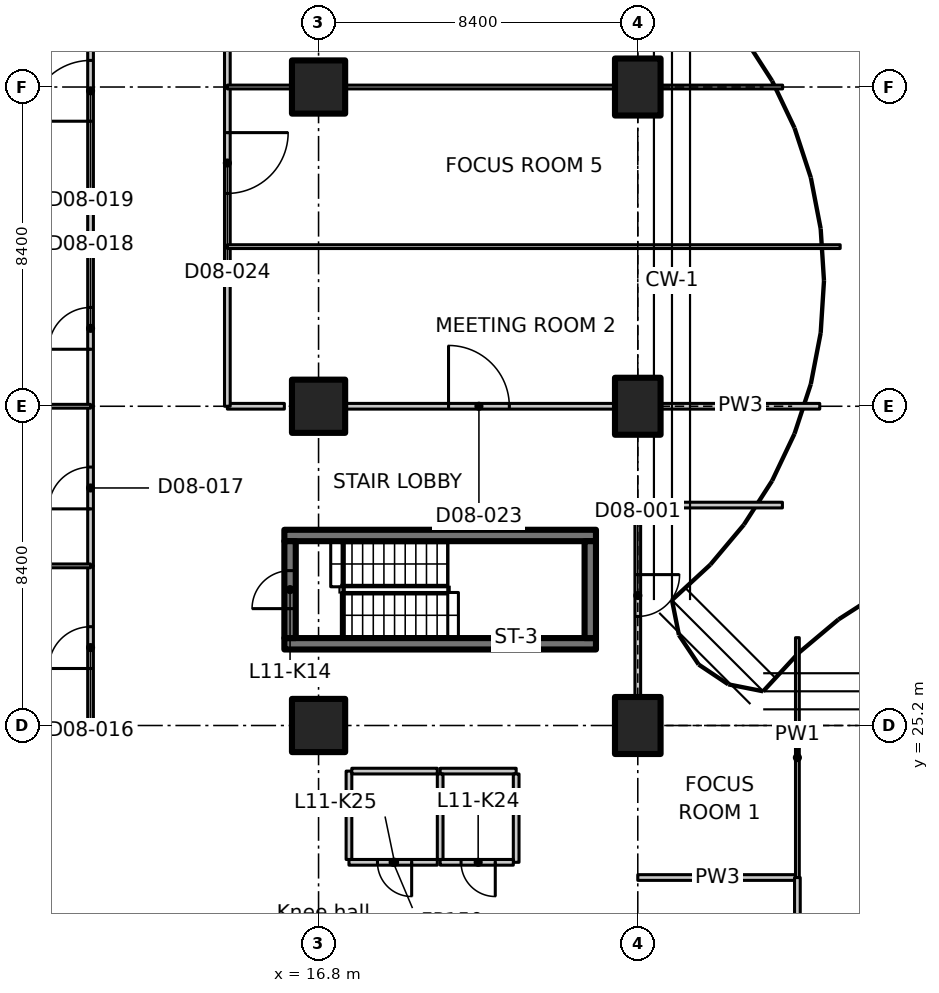
"""IFC4 building model, lengths in metres.
Left out: names, types, materials, properties, quantities, classifications, styles, units other than length and angle.
Written with IfcOpenShell. Run it as: python <this file> out.ifc"""

import sys

from ifc_helpers import new_model, si_unit, direction, frame, frame_2d, origin, origin_2d, place, context, subcontext, project, spatial, polyline, rectangle, outline, extrude, element, fill, save


model = new_model("IFC4")
c1 = context("Model", 3, precision=1e-05, world=origin(), true_north=direction((0.0, 1.0)))
c2 = subcontext(c1, "Body", "Model", "MODEL_VIEW")
j1 = project(units=[si_unit("LENGTHUNIT", "METRE"), si_unit("PLANEANGLEUNIT", "RADIAN")], contexts=[c1])
p1 = place(None, origin())
s1 = spatial("IfcSite", under=j1, at=p1, CompositionType="ELEMENT")
p2 = place(p1, origin())
s2 = spatial("IfcBuilding", under=s1, at=p2, CompositionType="ELEMENT")
p3 = place(p2, frame((0.0, 0.0, 54.5)))
s3 = spatial("IfcBuildingStorey", under=s2, at=p3, CompositionType="ELEMENT", Elevation=54.5)
for number, where, z_axis, x_axis in (
    (1, (16.8, 25.2, 0.0), (0.0, 0.0, 1.0), (1.0, 0.0, 0.0)),
    (2, (16.8, 33.6, 0.0), (0.0, 0.0, 1.0), (1.0, 0.0, 0.0)),
    (3, (16.8, 42.0, 0.0), (0.0, 0.0, 1.0), (1.0, 0.0, 0.0)),
):
    element("IfcColumn", number, at=place(p3, frame(where, z_axis=z_axis, x_axis=x_axis)), inside=s3, PredefinedType="COLUMN", context=c2, shape_type="SweptSolid", body=[
        extrude(rectangle(XDim=1.4, YDim=1.4, at=origin_2d()), origin(), (0.0, 0.0, 1.0), 3.35),
    ])
for number, where, z_axis, x_axis in (
    (4, (25.2, 25.2, 0.0), (0.0, 0.0, 1.0), (1.0, 0.0, 0.0)),
    (5, (25.2, 33.6, 0.0), (0.0, 0.0, 1.0), (1.0, 0.0, 0.0)),
    (6, (25.2, 42.0, 0.0), (0.0, 0.0, 1.0), (1.0, 0.0, 0.0)),
):
    element("IfcColumn", number, at=place(p3, frame(where, z_axis=z_axis, x_axis=x_axis)), inside=s3, PredefinedType="COLUMN", context=c2, shape_type="SweptSolid", body=[
        extrude(rectangle(XDim=1.2, YDim=1.5, at=origin_2d()), origin(), (0.0, 0.0, 1.0), 3.35),
    ])
for number, where, z_axis, x_axis in (
    (7, (15.9, 27.35, 0.0), (0.0, 0.0, 1.0), (1.0, 0.0, 0.0)),
    (8, (15.9, 30.2, 0.0), (0.0, 0.0, 1.0), (1.0, 0.0, 0.0)),
):
    element("IfcWall", number, at=place(p3, frame(where, z_axis=z_axis, x_axis=x_axis)), inside=s3, PredefinedType="SHEAR", context=c2, shape_type="SweptSolid", body=[
        extrude(rectangle(XDim=8.2, YDim=0.3, at=frame_2d((4.1, 0.0))), origin(), (0.0, 0.0, 1.0), 3.35),
    ])
p4 = place(p3, frame((16.05, 27.5, 0.0), z_axis=(0.0, 0.0, 1.0), x_axis=(0.0, 1.0, 0.0)))
e9 = element("IfcWall", 9, at=p4, inside=s3, PredefinedType="SHEAR", context=c2, shape_type="SweptSolid", body=[
    extrude(rectangle(XDim=2.55, YDim=0.3, at=frame_2d((1.275, 0.0))), origin(), (0.0, 0.0, 1.0), 3.35),
])
p5 = place(p4, frame((0.775, 0.0, 0.0)))
e10 = element("IfcOpeningElement", 10, at=p5, cuts=e9, PredefinedType="OPENING", context=c2, shape_type="SweptSolid", body=[
    extrude(rectangle(XDim=1.0, YDim=2.1, at=frame_2d((0.5, 1.05))), frame((0.0, 0.16, 0.0), z_axis=(0.0, -1.0, 0.0), x_axis=(1.0, 0.0, 0.0)), (0.0, 0.0, 1.0), 0.32),
])
p6 = place(p3, frame((23.95, 27.5, 0.0), z_axis=(0.0, 0.0, 1.0), x_axis=(0.0, 1.0, 0.0)))
e11 = element("IfcWall", 11, at=p6, inside=s3, PredefinedType="SHEAR", context=c2, shape_type="SweptSolid", body=[
    extrude(rectangle(XDim=2.55, YDim=0.3, at=frame_2d((1.275, 0.0))), origin(), (0.0, 0.0, 1.0), 3.35),
])
p7 = place(p3, frame((20.0, 24.0, 0.0), z_axis=(0.0, 0.0, 1.0), x_axis=(1.0, 0.0, 0.0)))
e12 = element("IfcWall", 12, at=p7, inside=s3, PredefinedType="PARTITIONING", context=c2, shape_type="SweptSolid", body=[
    extrude(rectangle(XDim=2.0, YDim=0.15, at=frame_2d((1.0, 0.0))), origin(), (0.0, 0.0, 1.0), 3.35),
])
p8 = place(p3, frame((22.0, 23.925, 0.0), z_axis=(0.0, 0.0, 1.0), x_axis=(0.0, -1.0, 0.0)))
e13 = element("IfcWall", 13, at=p8, inside=s3, PredefinedType="PARTITIONING", context=c2, shape_type="SweptSolid", body=[
    extrude(rectangle(XDim=2.325, YDim=0.15, at=frame_2d((1.163, 0.0))), origin(), (0.0, 0.0, 1.0), 3.35),
])
p9 = place(p3, frame((21.925, 21.6, 0.0), z_axis=(0.0, 0.0, 1.0), x_axis=(-1.0, 0.0, 0.0)))
e14 = element("IfcWall", 14, at=p9, inside=s3, PredefinedType="PARTITIONING", context=c2, shape_type="SweptSolid", body=[
    extrude(rectangle(XDim=1.925, YDim=0.15, at=frame_2d((0.962, 0.0))), origin(), (0.0, 0.0, 1.0), 3.35),
])
p10 = place(p9, frame((0.475, 0.0, 0.0)))
e15 = element("IfcOpeningElement", 15, at=p10, cuts=e14, PredefinedType="OPENING", context=c2, shape_type="SweptSolid", body=[
    extrude(rectangle(XDim=0.9, YDim=2.1, at=frame_2d((0.45, 1.05))), frame((0.0, 0.085, 0.0), z_axis=(0.0, -1.0, 0.0), x_axis=(1.0, 0.0, 0.0)), (0.0, 0.0, 1.0), 0.17),
])
p11 = place(p3, frame((20.0, 21.675, 0.0), z_axis=(0.0, 0.0, 1.0), x_axis=(0.0, 1.0, 0.0)))
e16 = element("IfcWall", 16, at=p11, inside=s3, PredefinedType="PARTITIONING", context=c2, shape_type="SweptSolid", body=[
    extrude(rectangle(XDim=2.25, YDim=0.15, at=frame_2d((1.125, 0.0))), origin(), (0.0, 0.0, 1.0), 3.35),
])
p12 = place(p3, frame((19.925, 21.6, 0.0), z_axis=(0.0, 0.0, 1.0), x_axis=(-1.0, 0.0, 0.0)))
e17 = element("IfcWall", 17, at=p12, inside=s3, PredefinedType="PARTITIONING", context=c2, shape_type="SweptSolid", body=[
    extrude(rectangle(XDim=2.325, YDim=0.15, at=frame_2d((1.163, 0.0))), origin(), (0.0, 0.0, 1.0), 3.35),
])
p13 = place(p12, frame((0.675, 0.0, 0.0)))
e18 = element("IfcOpeningElement", 18, at=p13, cuts=e17, PredefinedType="OPENING", context=c2, shape_type="SweptSolid", body=[
    extrude(rectangle(XDim=0.9, YDim=2.1, at=frame_2d((0.45, 1.05))), frame((0.0, 0.085, 0.0), z_axis=(0.0, -1.0, 0.0), x_axis=(1.0, 0.0, 0.0)), (0.0, 0.0, 1.0), 0.17),
])
p14 = place(p3, frame((17.6, 21.675, 0.0), z_axis=(0.0, 0.0, 1.0), x_axis=(0.0, 1.0, 0.0)))
e19 = element("IfcWall", 19, at=p14, inside=s3, PredefinedType="PARTITIONING", context=c2, shape_type="SweptSolid", body=[
    extrude(rectangle(XDim=2.325, YDim=0.15, at=frame_2d((1.163, 0.0))), origin(), (0.0, 0.0, 1.0), 3.35),
])
p15 = place(p3, frame((17.675, 24.0, 0.0), z_axis=(0.0, 0.0, 1.0), x_axis=(1.0, 0.0, 0.0)))
e20 = element("IfcWall", 20, at=p15, inside=s3, PredefinedType="PARTITIONING", context=c2, shape_type="SweptSolid", body=[
    extrude(rectangle(XDim=2.25, YDim=0.15, at=frame_2d((1.125, 0.0))), origin(), (0.0, 0.0, 1.0), 3.35),
])
p16 = place(p3, frame((25.2, 21.2, 0.0), z_axis=(0.0, 0.0, 1.0), x_axis=(1.0, 0.0, 0.0)))
e21 = element("IfcWall", 21, at=p16, inside=s3, PredefinedType="PARTITIONING", context=c2, shape_type="SweptSolid", body=[
    extrude(rectangle(XDim=4.2, YDim=0.15, at=frame_2d((2.1, 0.0))), origin(), (0.0, 0.0, 1.0), 3.33),
])
p17 = place(p3, frame((29.4, 21.2, 0.0), z_axis=(0.0, 0.0, 1.0), x_axis=(0.0, -1.0, 0.0)))
e22 = element("IfcWall", 22, at=p17, inside=s3, PredefinedType="PARTITIONING", context=c2, shape_type="SweptSolid", body=[
    extrude(rectangle(XDim=8.2, YDim=0.15, at=frame_2d((4.1, 0.0))), origin(), (0.0, 0.0, 1.0), 3.33),
])
p18 = place(p3, frame((29.4, 27.511, 0.0), z_axis=(0.0, 0.0, 1.0), x_axis=(0.0, -1.0, 0.0)))
e23 = element("IfcWall", 23, at=p18, inside=s3, PredefinedType="PARTITIONING", context=c2, shape_type="SweptSolid", body=[
    extrude(outline(polyline([(0.0, 0.0), (6.311, 0.0), (6.311, 3.33), (2.761, 3.33), (2.759, 2.98), (1.863, 2.98), (1.861, 3.33), (0.236, 3.33), (0.0, 3.33), (0.0, 0.0)])), frame((0.0, 0.05, 0.0), z_axis=(0.0, -1.0, 0.0), x_axis=(1.0, 0.0, 0.0)), (0.0, 0.0, 1.0), 0.1),
])
p19 = place(p3, frame((25.2, 31.0, 0.0), z_axis=(0.0, 0.0, 1.0), x_axis=(0.0, -1.0, 0.0)))
e24 = element("IfcWall", 24, at=p19, inside=s3, PredefinedType="PARTITIONING", context=c2, shape_type="SweptSolid", body=[
    extrude(outline(polyline([(0.0, 0.0), (5.03, 0.0), (5.03, 2.98), (0.0, 2.98), (0.0, 0.0)])), frame((0.0, 0.075, 0.0), z_axis=(0.0, -1.0, 0.0), x_axis=(1.0, 0.0, 0.0)), (0.0, 0.0, 1.0), 0.15),
])
p20 = place(p19, frame((1.83, 0.0, 0.0)))
e25 = element("IfcOpeningElement", 25, at=p20, cuts=e24, PredefinedType="OPENING", context=c2, shape_type="SweptSolid", body=[
    extrude(rectangle(XDim=1.1, YDim=2.1, at=frame_2d((0.55, 1.05))), frame((0.0, 0.085, 0.0), z_axis=(0.0, -1.0, 0.0), x_axis=(1.0, 0.0, 0.0)), (0.0, 0.0, 1.0), 0.17),
])
p21 = place(p3, frame((25.2, 31.0, 0.0), z_axis=(0.0, 0.0, 1.0), x_axis=(1.0, 0.0, 0.0)))
e26 = element("IfcWall", 26, at=p21, inside=s3, PredefinedType="PARTITIONING", context=c2, shape_type="SweptSolid", body=[
    extrude(rectangle(XDim=3.806, YDim=0.15, at=frame_2d((1.903, 0.0))), origin(), (0.0, 0.0, 1.0), 2.98),
])
p22 = place(p3, frame((10.8, 25.2, 0.0), z_axis=(0.0, 0.0, 1.0), x_axis=(0.0, 1.0, 0.0)))
e27 = element("IfcWall", 27, at=p22, inside=s3, PredefinedType="PARTITIONING", context=c2, shape_type="SweptSolid", body=[
    extrude(rectangle(XDim=4.2, YDim=0.15, at=frame_2d((2.1, 0.0))), origin(), (0.0, 0.0, 1.0), 3.33),
])
p23 = place(p22, frame((1.5, 0.0, 0.0)))
e28 = element("IfcOpeningElement", 28, at=p23, cuts=e27, PredefinedType="OPENING", context=c2, shape_type="SweptSolid", body=[
    extrude(rectangle(XDim=1.1, YDim=2.1, at=frame_2d((0.55, 1.05))), frame((0.0, 0.085, 0.0), z_axis=(0.0, -1.0, 0.0), x_axis=(1.0, 0.0, 0.0)), (0.0, 0.0, 1.0), 0.17),
])
p24 = place(p3, frame((10.8, 29.4, 0.0), z_axis=(0.0, 0.0, 1.0), x_axis=(0.0, 1.0, 0.0)))
e29 = element("IfcWall", 29, at=p24, inside=s3, PredefinedType="PARTITIONING", context=c2, shape_type="SweptSolid", body=[
    extrude(rectangle(XDim=4.2, YDim=0.15, at=frame_2d((2.1, 0.0))), origin(), (0.0, 0.0, 1.0), 3.33),
])
p25 = place(p24, frame((1.5, 0.0, 0.0)))
e30 = element("IfcOpeningElement", 30, at=p25, cuts=e29, PredefinedType="OPENING", context=c2, shape_type="SweptSolid", body=[
    extrude(rectangle(XDim=1.1, YDim=2.1, at=frame_2d((0.55, 1.05))), frame((0.0, 0.085, 0.0), z_axis=(0.0, -1.0, 0.0), x_axis=(1.0, 0.0, 0.0)), (0.0, 0.0, 1.0), 0.17),
])
p26 = place(p3, frame((14.4, 33.6, 0.0), z_axis=(0.0, 0.0, 1.0), x_axis=(1.0, 0.0, 0.0)))
e31 = element("IfcWall", 31, at=p26, inside=s3, PredefinedType="PARTITIONING", context=c2, shape_type="SweptSolid", body=[
    extrude(rectangle(XDim=1.5, YDim=0.15, at=frame_2d((0.75, 0.0))), origin(), (0.0, 0.0, 1.0), 3.33),
])
p27 = place(p3, frame((17.52, 33.6, 0.0), z_axis=(0.0, 0.0, 1.0), x_axis=(1.0, 0.0, 0.0)))
e32 = element("IfcWall", 32, at=p27, inside=s3, PredefinedType="PARTITIONING", context=c2, shape_type="SweptSolid", body=[
    extrude(rectangle(XDim=7.06, YDim=0.15, at=frame_2d((3.53, 0.0))), origin(), (0.0, 0.0, 1.0), 3.33),
])
p28 = place(p27, frame((2.7, 0.0, 0.0)))
e33 = element("IfcOpeningElement", 33, at=p28, cuts=e32, PredefinedType="OPENING", context=c2, shape_type="SweptSolid", body=[
    extrude(rectangle(XDim=1.6, YDim=2.1, at=frame_2d((0.8, 1.05))), frame((0.0, 0.085, 0.0), z_axis=(0.0, -1.0, 0.0), x_axis=(1.0, 0.0, 0.0)), (0.0, 0.0, 1.0), 0.17),
])
p29 = place(p3, frame((25.82, 33.6, 0.0), z_axis=(0.0, 0.0, 1.0), x_axis=(1.0, 0.0, 0.0)))
e34 = element("IfcWall", 34, at=p29, inside=s3, PredefinedType="PARTITIONING", context=c2, shape_type="SweptSolid", body=[
    extrude(rectangle(XDim=4.168, YDim=0.15, at=frame_2d((2.084, 0.0))), origin(), (0.0, 0.0, 1.0), 2.98),
])
p30 = place(p3, frame((10.8, 33.6, 0.0), z_axis=(0.0, 0.0, 1.0), x_axis=(0.0, 1.0, 0.0)))
e35 = element("IfcWall", 35, at=p30, inside=s3, PredefinedType="PARTITIONING", context=c2, shape_type="SweptSolid", body=[
    extrude(rectangle(XDim=4.2, YDim=0.15, at=frame_2d((2.1, 0.0))), origin(), (0.0, 0.0, 1.0), 3.33),
])
p31 = place(p30, frame((1.5, 0.0, 0.0)))
e36 = element("IfcOpeningElement", 36, at=p31, cuts=e35, PredefinedType="OPENING", context=c2, shape_type="SweptSolid", body=[
    extrude(rectangle(XDim=1.1, YDim=2.1, at=frame_2d((0.55, 1.05))), frame((0.0, 0.085, 0.0), z_axis=(0.0, -1.0, 0.0), x_axis=(1.0, 0.0, 0.0)), (0.0, 0.0, 1.0), 0.17),
])
p32 = place(p3, frame((10.8, 37.8, 0.0), z_axis=(0.0, 0.0, 1.0), x_axis=(0.0, 1.0, 0.0)))
e37 = element("IfcWall", 37, at=p32, inside=s3, PredefinedType="PARTITIONING", context=c2, shape_type="SweptSolid", body=[
    extrude(rectangle(XDim=8.4, YDim=0.15, at=frame_2d((4.2, 0.0))), origin(), (0.0, 0.0, 1.0), 3.33),
])
p33 = place(p32, frame((3.3, 0.0, 0.0)))
e38 = element("IfcOpeningElement", 38, at=p33, cuts=e37, PredefinedType="OPENING", context=c2, shape_type="SweptSolid", body=[
    extrude(rectangle(XDim=1.6, YDim=2.1, at=frame_2d((0.8, 1.05))), frame((0.0, 0.085, 0.0), z_axis=(0.0, -1.0, 0.0), x_axis=(1.0, 0.0, 0.0)), (0.0, 0.0, 1.0), 0.17),
])
p34 = place(p3, frame((14.4, 37.8, 0.0), z_axis=(0.0, 0.0, 1.0), x_axis=(0.0, -1.0, 0.0)))
e39 = element("IfcWall", 39, at=p34, inside=s3, PredefinedType="PARTITIONING", context=c2, shape_type="SweptSolid", body=[
    extrude(rectangle(XDim=4.2, YDim=0.15, at=frame_2d((2.1, 0.0))), origin(), (0.0, 0.0, 1.0), 3.33),
])
p35 = place(p3, frame((14.4, 42.0, 0.0), z_axis=(0.0, 0.0, 1.0), x_axis=(0.0, -1.0, 0.0)))
e40 = element("IfcWall", 40, at=p35, inside=s3, PredefinedType="PARTITIONING", context=c2, shape_type="SweptSolid", body=[
    extrude(rectangle(XDim=4.2, YDim=0.15, at=frame_2d((2.1, 0.0))), origin(), (0.0, 0.0, 1.0), 3.33),
])
p36 = place(p35, frame((1.2, 0.0, 0.0)))
e41 = element("IfcOpeningElement", 41, at=p36, cuts=e40, PredefinedType="OPENING", context=c2, shape_type="SweptSolid", body=[
    extrude(rectangle(XDim=1.6, YDim=2.1, at=frame_2d((0.8, 1.05))), frame((0.0, 0.085, 0.0), z_axis=(0.0, -1.0, 0.0), x_axis=(1.0, 0.0, 0.0)), (0.0, 0.0, 1.0), 0.17),
])
p37 = place(p3, frame((14.4, 46.2, 0.0), z_axis=(0.0, 0.0, 1.0), x_axis=(0.0, -1.0, 0.0)))
e42 = element("IfcWall", 42, at=p37, inside=s3, PredefinedType="PARTITIONING", context=c2, shape_type="SweptSolid", body=[
    extrude(rectangle(XDim=4.2, YDim=0.15, at=frame_2d((2.1, 0.0))), origin(), (0.0, 0.0, 1.0), 3.33),
])
p38 = place(p37, frame((1.5, 0.0, 0.0)))
e43 = element("IfcOpeningElement", 43, at=p38, cuts=e42, PredefinedType="OPENING", context=c2, shape_type="SweptSolid", body=[
    extrude(rectangle(XDim=1.1, YDim=2.1, at=frame_2d((0.55, 1.05))), frame((0.0, 0.085, 0.0), z_axis=(0.0, -1.0, 0.0), x_axis=(1.0, 0.0, 0.0)), (0.0, 0.0, 1.0), 0.17),
])
p39 = place(p3, frame((-1.365, 29.4, 0.0), z_axis=(0.0, 0.0, 1.0), x_axis=(1.0, 0.0, 0.0)))
e44 = element("IfcWall", 44, at=p39, inside=s3, PredefinedType="PARTITIONING", context=c2, shape_type="SweptSolid", body=[
    extrude(outline(polyline([(0.0, 0.0), (12.165, 0.0), (12.165, 3.33), (1.815, 3.33), (1.813, 2.98), (0.917, 2.98), (0.915, 3.33), (0.265, 3.33), (0.0, 3.33), (0.0, 0.0)])), frame((0.0, 0.05, 0.0), z_axis=(0.0, -1.0, 0.0), x_axis=(1.0, 0.0, 0.0)), (0.0, 0.0, 1.0), 0.1),
])
p40 = place(p3, frame((9.12, 33.6, 0.0), z_axis=(0.0, 0.0, 1.0), x_axis=(1.0, 0.0, 0.0)))
e45 = element("IfcWall", 45, at=p40, inside=s3, PredefinedType="PARTITIONING", context=c2, shape_type="SweptSolid", body=[
    extrude(rectangle(XDim=1.68, YDim=0.1, at=frame_2d((0.84, 0.0))), origin(), (0.0, 0.0, 1.0), 3.33),
])
p41 = place(p3, frame((-1.365, 37.8, 0.0), z_axis=(0.0, 0.0, 1.0), x_axis=(1.0, 0.0, 0.0)))
e46 = element("IfcWall", 46, at=p41, inside=s3, PredefinedType="PARTITIONING", context=c2, shape_type="SweptSolid", body=[
    extrude(outline(polyline([(0.0, 0.0), (12.165, 0.0), (12.165, 3.33), (1.815, 3.33), (1.813, 2.98), (0.917, 2.98), (0.915, 3.33), (0.265, 3.33), (0.0, 3.33), (0.0, 0.0)])), frame((0.0, 0.062, 0.0), z_axis=(0.0, -1.0, 0.0), x_axis=(1.0, 0.0, 0.0)), (0.0, 0.0, 1.0), 0.125),
])
p42 = place(p3, frame((14.4, 37.8, 0.0), z_axis=(0.0, 0.0, 1.0), x_axis=(1.0, 0.0, 0.0)))
e47 = element("IfcWall", 47, at=p42, inside=s3, PredefinedType="PARTITIONING", context=c2, shape_type="SweptSolid", body=[
    extrude(outline(polyline([(0.0, 0.0), (16.126, 0.0), (16.126, 3.33), (15.843, 3.33), (11.25, 3.33), (11.248, 2.98), (10.352, 2.98), (10.35, 3.33), (0.0, 3.33), (0.0, 0.0)])), frame((0.0, 0.05, 0.0), z_axis=(0.0, -1.0, 0.0), x_axis=(1.0, 0.0, 0.0)), (0.0, 0.0, 1.0), 0.1),
])
p43 = place(p3, frame((14.4, 42.0, 0.0), z_axis=(0.0, 0.0, 1.0), x_axis=(1.0, 0.0, 0.0)))
e48 = element("IfcWall", 48, at=p43, inside=s3, PredefinedType="PARTITIONING", context=c2, shape_type="SweptSolid", body=[
    extrude(rectangle(XDim=1.68, YDim=0.1, at=frame_2d((0.84, 0.0))), origin(), (0.0, 0.0, 1.0), 3.33),
])
p44 = place(p3, frame((17.52, 42.0, 0.0), z_axis=(0.0, 0.0, 1.0), x_axis=(1.0, 0.0, 0.0)))
e49 = element("IfcWall", 49, at=p44, inside=s3, PredefinedType="PARTITIONING", context=c2, shape_type="SweptSolid", body=[
    extrude(rectangle(XDim=7.06, YDim=0.1, at=frame_2d((3.53, 0.0))), origin(), (0.0, 0.0, 1.0), 3.33),
])
p45 = place(p3, frame((25.82, 42.0, 0.0), z_axis=(0.0, 0.0, 1.0), x_axis=(1.0, 0.0, 0.0)))
e50 = element("IfcWall", 50, at=p45, inside=s3, PredefinedType="PARTITIONING", context=c2, shape_type="SweptSolid", body=[
    extrude(rectangle(XDim=3.191, YDim=0.1, at=frame_2d((1.596, 0.0))), origin(), (0.0, 0.0, 1.0), 2.98),
])
p46 = place(p5, origin())
e51 = element("IfcDoor", 51, at=p46, inside=s3, OperationType="SINGLE_SWING_LEFT", PredefinedType="DOOR", context=c2, shape_type="SweptSolid", body=[
    extrude(rectangle(XDim=1.0, YDim=2.1, at=frame_2d((0.5, 1.05))), frame((0.0, 0.025, 0.0), z_axis=(0.0, -1.0, 0.0), x_axis=(1.0, 0.0, 0.0)), (0.0, 0.0, 1.0), 0.05),
])
fill(e10, e51)
p47 = place(p10, origin())
e52 = element("IfcDoor", 52, at=p47, inside=s3, OperationType="SINGLE_SWING_LEFT", PredefinedType="DOOR", context=c2, shape_type="SweptSolid", body=[
    extrude(rectangle(XDim=0.9, YDim=2.1, at=frame_2d((0.45, 1.05))), frame((0.0, 0.025, 0.0), z_axis=(0.0, -1.0, 0.0), x_axis=(1.0, 0.0, 0.0)), (0.0, 0.0, 1.0), 0.05),
])
fill(e15, e52)
p48 = place(p13, origin())
e53 = element("IfcDoor", 53, at=p48, inside=s3, OperationType="SINGLE_SWING_RIGHT", PredefinedType="DOOR", context=c2, shape_type="SweptSolid", body=[
    extrude(rectangle(XDim=0.9, YDim=2.1, at=frame_2d((0.45, 1.05))), frame((0.0, 0.025, 0.0), z_axis=(0.0, -1.0, 0.0), x_axis=(1.0, 0.0, 0.0)), (0.0, 0.0, 1.0), 0.05),
])
fill(e18, e53)
p49 = place(p20, origin())
e54 = element("IfcDoor", 54, at=p49, inside=s3, OperationType="SINGLE_SWING_RIGHT", PredefinedType="DOOR", context=c2, shape_type="SweptSolid", body=[
    extrude(rectangle(XDim=1.1, YDim=2.1, at=frame_2d((0.55, 1.05))), frame((0.0, 0.025, 0.0), z_axis=(0.0, -1.0, 0.0), x_axis=(1.0, 0.0, 0.0)), (0.0, 0.0, 1.0), 0.05),
])
fill(e25, e54)
p50 = place(p23, origin())
e55 = element("IfcDoor", 55, at=p50, inside=s3, OperationType="SINGLE_SWING_LEFT", PredefinedType="DOOR", context=c2, shape_type="SweptSolid", body=[
    extrude(rectangle(XDim=1.1, YDim=2.1, at=frame_2d((0.55, 1.05))), frame((0.0, 0.025, 0.0), z_axis=(0.0, -1.0, 0.0), x_axis=(1.0, 0.0, 0.0)), (0.0, 0.0, 1.0), 0.05),
])
fill(e28, e55)
p51 = place(p25, origin())
e56 = element("IfcDoor", 56, at=p51, inside=s3, OperationType="SINGLE_SWING_LEFT", PredefinedType="DOOR", context=c2, shape_type="SweptSolid", body=[
    extrude(rectangle(XDim=1.1, YDim=2.1, at=frame_2d((0.55, 1.05))), frame((0.0, 0.025, 0.0), z_axis=(0.0, -1.0, 0.0), x_axis=(1.0, 0.0, 0.0)), (0.0, 0.0, 1.0), 0.05),
])
fill(e30, e56)
p52 = place(p31, origin())
e57 = element("IfcDoor", 57, at=p52, inside=s3, OperationType="SINGLE_SWING_LEFT", PredefinedType="DOOR", context=c2, shape_type="SweptSolid", body=[
    extrude(rectangle(XDim=1.1, YDim=2.1, at=frame_2d((0.55, 1.05))), frame((0.0, 0.025, 0.0), z_axis=(0.0, -1.0, 0.0), x_axis=(1.0, 0.0, 0.0)), (0.0, 0.0, 1.0), 0.05),
])
fill(e36, e57)
p53 = place(p33, origin())
e58 = element("IfcDoor", 58, at=p53, inside=s3, OperationType="DOUBLE_DOOR_SINGLE_SWING", PredefinedType="DOOR", context=c2, shape_type="SweptSolid", body=[
    extrude(rectangle(XDim=1.6, YDim=2.1, at=frame_2d((0.8, 1.05))), frame((0.0, 0.025, 0.0), z_axis=(0.0, -1.0, 0.0), x_axis=(1.0, 0.0, 0.0)), (0.0, 0.0, 1.0), 0.05),
])
fill(e38, e58)
p54 = place(p28, origin())
e59 = element("IfcDoor", 59, at=p54, inside=s3, OperationType="DOUBLE_DOOR_SINGLE_SWING", PredefinedType="DOOR", context=c2, shape_type="SweptSolid", body=[
    extrude(rectangle(XDim=1.6, YDim=2.1, at=frame_2d((0.8, 1.05))), frame((0.0, 0.025, 0.0), z_axis=(0.0, -1.0, 0.0), x_axis=(1.0, 0.0, 0.0)), (0.0, 0.0, 1.0), 0.05),
])
fill(e33, e59)
p55 = place(p36, origin())
e60 = element("IfcDoor", 60, at=p55, inside=s3, OperationType="DOUBLE_DOOR_SINGLE_SWING", PredefinedType="DOOR", context=c2, shape_type="SweptSolid", body=[
    extrude(rectangle(XDim=1.6, YDim=2.1, at=frame_2d((0.8, 1.05))), frame((0.0, 0.025, 0.0), z_axis=(0.0, -1.0, 0.0), x_axis=(1.0, 0.0, 0.0)), (0.0, 0.0, 1.0), 0.05),
])
fill(e41, e60)
save(model, sys.argv[1])
